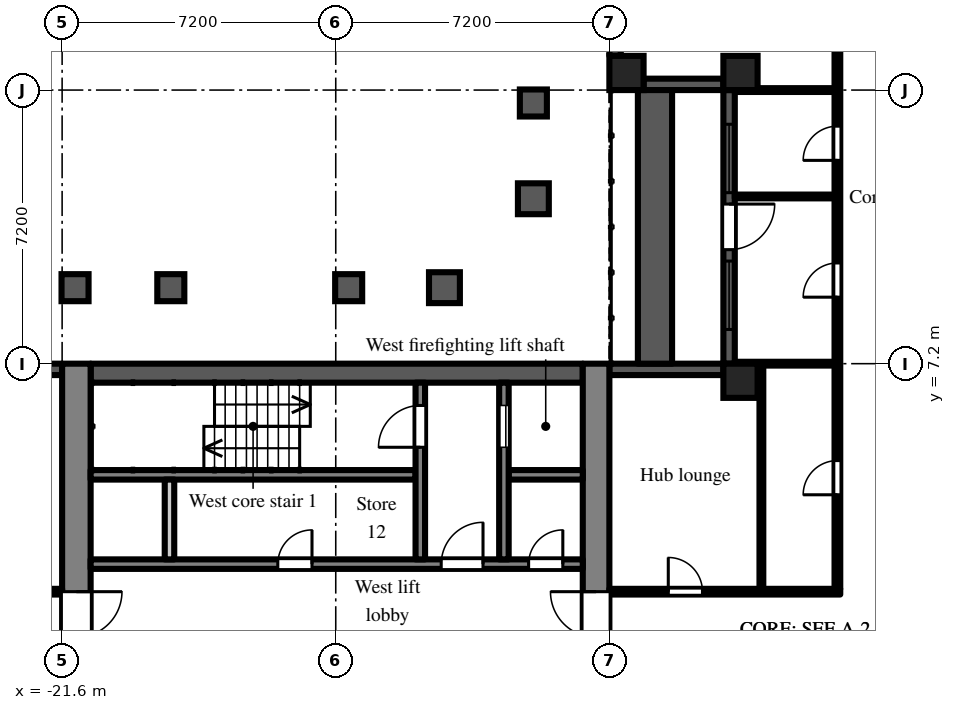
"""IFC4 building model, lengths in metres.
Left out: names, types, materials, properties, quantities, classifications, styles, units other than length and angle.
Written with IfcOpenShell. Run it as: python <this file> out.ifc"""

import sys

from ifc_helpers import new_model, si_unit, direction, frame, frame_2d, origin, origin_2d, place, context, subcontext, project, spatial, rectangle, extrude, element, fill, save


model = new_model("IFC4")
c1 = context("Model", 3, precision=1e-05, world=origin(), true_north=direction((0.0, 1.0)))
c2 = subcontext(c1, "Body", "Model", "MODEL_VIEW")
j1 = project(units=[si_unit("LENGTHUNIT", "METRE"), si_unit("PLANEANGLEUNIT", "RADIAN")], contexts=[c1])
p1 = place(None, origin())
s1 = spatial("IfcSite", under=j1, at=p1, CompositionType="ELEMENT")
p2 = place(p1, origin())
s2 = spatial("IfcBuilding", under=s1, at=p2, CompositionType="ELEMENT")
p3 = place(p2, frame((0.0, 0.0, 93.9)))
s3 = spatial("IfcBuildingStorey", under=s2, at=p3, CompositionType="ELEMENT", Elevation=93.9)
for number, where, z_axis, x_axis in (
    (1, (-6.75, 14.85, 0.0), (0.0, 0.0, 1.0), (1.0, 0.0, 0.0)),
    (2, (-3.75, 6.75, 0.0), (0.0, 0.0, 1.0), (1.0, 0.0, 0.0)),
    (3, (-3.75, 14.85, 0.0), (0.0, 0.0, 1.0), (1.0, 0.0, 0.0)),
):
    element("IfcColumn", number, at=place(p3, frame(where, z_axis=z_axis, x_axis=x_axis)), inside=s3, PredefinedType="COLUMN", context=c2, shape_type="SweptSolid", body=[
        extrude(rectangle(XDim=0.9, YDim=0.9, at=origin_2d()), origin(), (0.0, 0.0, 1.0), 3.0),
    ])
p4 = place(p3, frame((-7.05, 17.1, 0.0), z_axis=(0.0, 0.0, 1.0), x_axis=(0.0, -1.0, 0.0)))
e4 = element("IfcWall", 4, at=p4, inside=s3, PredefinedType="SOLIDWALL", context=c2, shape_type="SweptSolid", body=[
    extrude(rectangle(XDim=1.8, YDim=0.3, at=frame_2d((0.9, 0.0))), origin(), (0.0, 0.0, 1.0), 2.1),
])
p5 = place(p4, frame((0.3, 0.0, 0.2)))
e5 = element("IfcOpeningElement", 5, at=p5, cuts=e4, PredefinedType="OPENING", context=c2, shape_type="SweptSolid", body=[
    extrude(rectangle(XDim=1.2, YDim=1.85, at=frame_2d((0.6, 0.925))), frame((0.0, 0.16, 0.0), z_axis=(0.0, -1.0, 0.0), x_axis=(1.0, 0.0, 0.0)), (0.0, 0.0, 1.0), 0.32),
])
p6 = place(p3, frame((-6.3, 14.55, 0.0), z_axis=(0.0, 0.0, 1.0), x_axis=(1.0, 0.0, 0.0)))
e6 = element("IfcWall", 6, at=p6, inside=s3, PredefinedType="SOLIDWALL", context=c2, shape_type="SweptSolid", body=[
    extrude(rectangle(XDim=2.1, YDim=0.3, at=frame_2d((1.05, 0.0))), origin(), (0.0, 0.0, 1.0), 2.1),
])
p7 = place(p3, frame((-4.05, 14.4, 0.0), z_axis=(0.0, 0.0, 1.0), x_axis=(0.0, -1.0, 0.0)))
e7 = element("IfcWall", 7, at=p7, inside=s3, PredefinedType="SOLIDWALL", context=c2, shape_type="SweptSolid", body=[
    extrude(rectangle(XDim=7.2, YDim=0.3, at=frame_2d((3.6, 0.0))), origin(), (0.0, 0.0, 1.0), 2.1),
])
p8 = place(p7, frame((3.0, 0.0, 0.0)))
e8 = element("IfcOpeningElement", 8, at=p8, cuts=e7, PredefinedType="OPENING", context=c2, shape_type="SweptSolid", body=[
    extrude(rectangle(XDim=1.2, YDim=2.05, at=frame_2d((0.6, 1.025))), frame((0.0, 0.16, 0.0), z_axis=(0.0, -1.0, 0.0), x_axis=(1.0, 0.0, 0.0)), (0.0, 0.0, 1.0), 0.32),
])
p9 = place(p7, frame((0.9, 0.0, 0.2)))
e9 = element("IfcOpeningElement", 9, at=p9, cuts=e7, PredefinedType="OPENING", context=c2, shape_type="SweptSolid", body=[
    extrude(rectangle(XDim=1.8, YDim=1.85, at=frame_2d((0.9, 0.925))), frame((0.0, 0.16, 0.0), z_axis=(0.0, -1.0, 0.0), x_axis=(1.0, 0.0, 0.0)), (0.0, 0.0, 1.0), 0.32),
])
p10 = place(p7, frame((4.5, 0.0, 0.2)))
e10 = element("IfcOpeningElement", 10, at=p10, cuts=e7, PredefinedType="OPENING", context=c2, shape_type="SweptSolid", body=[
    extrude(rectangle(XDim=1.8, YDim=1.85, at=frame_2d((0.9, 0.925))), frame((0.0, 0.16, 0.0), z_axis=(0.0, -1.0, 0.0), x_axis=(1.0, 0.0, 0.0)), (0.0, 0.0, 1.0), 0.32),
])
p11 = place(p3, frame((-4.2, 7.05, 0.0), z_axis=(0.0, 0.0, 1.0), x_axis=(-1.0, 0.0, 0.0)))
e11 = element("IfcWall", 11, at=p11, inside=s3, PredefinedType="SOLIDWALL", context=c2, shape_type="SweptSolid", body=[
    extrude(rectangle(XDim=3.0, YDim=0.3, at=frame_2d((1.5, 0.0))), origin(), (0.0, 0.0, 1.0), 2.1),
])
p12 = place(p3, frame((-21.6, 7.05, 0.0), z_axis=(0.0, 0.0, 1.0), x_axis=(-1.0, 0.0, 0.0)))
e12 = element("IfcWall", 12, at=p12, inside=s3, PredefinedType="SOLIDWALL", context=c2, shape_type="SweptSolid", body=[
    extrude(rectangle(XDim=2.7, YDim=0.3, at=frame_2d((1.35, 0.0))), origin(), (0.0, 0.0, 1.0), 2.1),
])
p13 = place(p12, frame((0.75, 0.0, 0.2)))
e13 = element("IfcOpeningElement", 13, at=p13, cuts=e12, PredefinedType="OPENING", context=c2, shape_type="SweptSolid", body=[
    extrude(rectangle(XDim=1.2, YDim=1.85, at=frame_2d((0.6, 0.925))), frame((0.0, 0.16, 0.0), z_axis=(0.0, -1.0, 0.0), x_axis=(1.0, 0.0, 0.0)), (0.0, 0.0, 1.0), 0.32),
])
p14 = place(p3, frame((-6.0, 7.2, 0.0), z_axis=(0.0, 0.0, 1.0), x_axis=(0.0, 1.0, 0.0)))
e14 = element("IfcWall", 14, at=p14, inside=s3, PredefinedType="PARAPET", context=c2, shape_type="SweptSolid", body=[
    extrude(rectangle(XDim=7.2, YDim=0.9, at=frame_2d((3.6, 0.0))), origin(), (0.0, 0.0, 1.0), 0.8),
])
p15 = place(p3, frame((-7.55, -7.2, 0.0), z_axis=(0.0, 0.0, 1.0), x_axis=(0.0, 1.0, 0.0)))
e15 = element("IfcWall", 15, at=p15, inside=s3, PredefinedType="SHEAR", context=c2, shape_type="SweptSolid", body=[
    extrude(rectangle(XDim=14.4, YDim=0.7, at=frame_2d((7.2, 0.0))), origin(), (0.0, 0.0, 1.0), 2.575),
])
p16 = place(p15, frame((6.0, 0.0, 0.0)))
e16 = element("IfcOpeningElement", 16, at=p16, cuts=e15, PredefinedType="OPENING", context=c2, shape_type="SweptSolid", body=[
    extrude(rectangle(XDim=2.4, YDim=2.2, at=frame_2d((1.2, 1.1))), frame((0.0, 0.36, 0.0), z_axis=(0.0, -1.0, 0.0), x_axis=(1.0, 0.0, 0.0)), (0.0, 0.0, 1.0), 0.72),
])
p17 = place(p3, frame((-21.225, -7.2, 0.0), z_axis=(0.0, 0.0, 1.0), x_axis=(0.0, 1.0, 0.0)))
e17 = element("IfcWall", 17, at=p17, inside=s3, PredefinedType="SHEAR", context=c2, shape_type="SweptSolid", body=[
    extrude(rectangle(XDim=14.4, YDim=0.75, at=frame_2d((7.2, 0.0))), origin(), (0.0, 0.0, 1.0), 2.575),
])
p18 = place(p17, frame((6.0, 0.0, 0.0)))
e18 = element("IfcOpeningElement", 18, at=p18, cuts=e17, PredefinedType="OPENING", context=c2, shape_type="SweptSolid", body=[
    extrude(rectangle(XDim=2.4, YDim=2.2, at=frame_2d((1.2, 1.1))), frame((0.0, 0.385, 0.0), z_axis=(0.0, -1.0, 0.0), x_axis=(1.0, 0.0, 0.0)), (0.0, 0.0, 1.0), 0.77),
])
p19 = place(p3, frame((-7.9, 6.95, 0.0), z_axis=(0.0, 0.0, 1.0), x_axis=(-1.0, 0.0, 0.0)))
e19 = element("IfcWall", 19, at=p19, inside=s3, PredefinedType="SHEAR", context=c2, shape_type="SweptSolid", body=[
    extrude(rectangle(XDim=12.95, YDim=0.5, at=frame_2d((6.475, 0.0))), origin(), (0.0, 0.0, 1.0), 2.575),
])
p20 = place(p3, frame((-7.9, 1.925, 0.0), z_axis=(0.0, 0.0, 1.0), x_axis=(-1.0, 0.0, 0.0)))
e20 = element("IfcWall", 20, at=p20, inside=s3, PredefinedType="SHEAR", context=c2, shape_type="SweptSolid", body=[
    extrude(rectangle(XDim=12.95, YDim=0.25, at=frame_2d((6.475, 0.0))), origin(), (0.0, 0.0, 1.0), 2.575),
])
p21 = place(p20, frame((0.525, 0.0, 0.0)))
e21 = element("IfcOpeningElement", 21, at=p21, cuts=e20, PredefinedType="OPENING", context=c2, shape_type="SweptSolid", body=[
    extrude(rectangle(XDim=0.9, YDim=2.1, at=frame_2d((0.45, 1.05))), frame((0.0, 0.135, 0.0), z_axis=(0.0, -1.0, 0.0), x_axis=(1.0, 0.0, 0.0)), (0.0, 0.0, 1.0), 0.27),
])
p22 = place(p20, frame((2.625, 0.0, 0.0)))
e22 = element("IfcOpeningElement", 22, at=p22, cuts=e20, PredefinedType="OPENING", context=c2, shape_type="SweptSolid", body=[
    extrude(rectangle(XDim=1.1, YDim=2.1, at=frame_2d((0.55, 1.05))), frame((0.0, 0.135, 0.0), z_axis=(0.0, -1.0, 0.0), x_axis=(1.0, 0.0, 0.0)), (0.0, 0.0, 1.0), 0.27),
])
p23 = place(p20, frame((7.125, 0.0, 0.0)))
e23 = element("IfcOpeningElement", 23, at=p23, cuts=e20, PredefinedType="OPENING", context=c2, shape_type="SweptSolid", body=[
    extrude(rectangle(XDim=0.9, YDim=2.1, at=frame_2d((0.45, 1.05))), frame((0.0, 0.135, 0.0), z_axis=(0.0, -1.0, 0.0), x_axis=(1.0, 0.0, 0.0)), (0.0, 0.0, 1.0), 0.27),
])
p24 = place(p3, frame((-7.9, 4.275, 0.0), z_axis=(0.0, 0.0, 1.0), x_axis=(-1.0, 0.0, 0.0)))
e24 = element("IfcWall", 24, at=p24, inside=s3, PredefinedType="SHEAR", context=c2, shape_type="SweptSolid", body=[
    extrude(rectangle(XDim=1.95, YDim=0.25, at=frame_2d((0.975, 0.0))), origin(), (0.0, 0.0, 1.0), 2.575),
])
p25 = place(p3, frame((-12.3, 4.275, 0.0), z_axis=(0.0, 0.0, 1.0), x_axis=(-1.0, 0.0, 0.0)))
e25 = element("IfcWall", 25, at=p25, inside=s3, PredefinedType="SHEAR", context=c2, shape_type="SweptSolid", body=[
    extrude(rectangle(XDim=8.55, YDim=0.25, at=frame_2d((4.275, 0.0))), origin(), (0.0, 0.0, 1.0), 2.575),
])
p26 = place(p3, frame((-9.975, 2.05, 0.0), z_axis=(0.0, 0.0, 1.0), x_axis=(0.0, 1.0, 0.0)))
e26 = element("IfcWall", 26, at=p26, inside=s3, PredefinedType="SHEAR", context=c2, shape_type="SweptSolid", body=[
    extrude(rectangle(XDim=4.65, YDim=0.25, at=frame_2d((2.325, 0.0))), origin(), (0.0, 0.0, 1.0), 2.575),
])
p27 = place(p26, frame((2.95, 0.0, 0.0)))
e27 = element("IfcOpeningElement", 27, at=p27, cuts=e26, PredefinedType="OPENING", context=c2, shape_type="SweptSolid", body=[
    extrude(rectangle(XDim=1.1, YDim=2.1, at=frame_2d((0.55, 1.05))), frame((0.0, 0.135, 0.0), z_axis=(0.0, -1.0, 0.0), x_axis=(1.0, 0.0, 0.0)), (0.0, 0.0, 1.0), 0.27),
])
p28 = place(p3, frame((-12.175, 2.05, 0.0), z_axis=(0.0, 0.0, 1.0), x_axis=(0.0, 1.0, 0.0)))
e28 = element("IfcWall", 28, at=p28, inside=s3, PredefinedType="SHEAR", context=c2, shape_type="SweptSolid", body=[
    extrude(rectangle(XDim=4.65, YDim=0.25, at=frame_2d((2.325, 0.0))), origin(), (0.0, 0.0, 1.0), 2.575),
])
p29 = place(p28, frame((2.95, 0.0, 0.0)))
e29 = element("IfcOpeningElement", 29, at=p29, cuts=e28, PredefinedType="OPENING", context=c2, shape_type="SweptSolid", body=[
    extrude(rectangle(XDim=1.1, YDim=2.1, at=frame_2d((0.55, 1.05))), frame((0.0, 0.135, 0.0), z_axis=(0.0, -1.0, 0.0), x_axis=(1.0, 0.0, 0.0)), (0.0, 0.0, 1.0), 0.27),
])
p30 = place(p3, frame((-18.775, 2.05, 0.0), z_axis=(0.0, 0.0, 1.0), x_axis=(0.0, 1.0, 0.0)))
e30 = element("IfcWall", 30, at=p30, inside=s3, PredefinedType="PARTITIONING", context=c2, shape_type="SweptSolid", body=[
    extrude(rectangle(XDim=2.1, YDim=0.25, at=frame_2d((1.05, 0.0))), origin(), (0.0, 0.0, 1.0), 2.575),
])
p31 = place(p3, frame((-36.5, 1.2, 0.0), z_axis=(0.0, 0.0, 1.0), x_axis=(1.0, 0.0, 0.0)))
e31 = element("IfcWall", 31, at=p31, inside=s3, PredefinedType="PARTITIONING", context=c2, shape_type="SweptSolid", body=[
    extrude(rectangle(XDim=14.9, YDim=0.15, at=frame_2d((7.45, 0.0))), origin(), (0.0, 0.0, 1.0), 2.575),
])
p32 = place(p31, frame((10.4, 0.0, 0.0)))
e32 = element("IfcOpeningElement", 32, at=p32, cuts=e31, PredefinedType="OPENING", context=c2, shape_type="SweptSolid", body=[
    extrude(rectangle(XDim=1.8, YDim=2.1, at=frame_2d((0.9, 1.05))), frame((0.0, 0.085, 0.0), z_axis=(0.0, -1.0, 0.0), x_axis=(1.0, 0.0, 0.0)), (0.0, 0.0, 1.0), 0.17),
])
p33 = place(p31, frame((4.7, 0.0, 0.0)))
e33 = element("IfcOpeningElement", 33, at=p33, cuts=e31, PredefinedType="OPENING", context=c2, shape_type="SweptSolid", body=[
    extrude(rectangle(XDim=1.0, YDim=2.1, at=frame_2d((0.5, 1.05))), frame((0.0, 0.085, 0.0), z_axis=(0.0, -1.0, 0.0), x_axis=(1.0, 0.0, 0.0)), (0.0, 0.0, 1.0), 0.17),
])
p34 = place(p31, frame((1.15, 0.0, 0.0)))
e34 = element("IfcOpeningElement", 34, at=p34, cuts=e31, PredefinedType="OPENING", context=c2, shape_type="SweptSolid", body=[
    extrude(rectangle(XDim=1.8, YDim=2.1, at=frame_2d((0.9, 1.05))), frame((0.0, 0.085, 0.0), z_axis=(0.0, -1.0, 0.0), x_axis=(1.0, 0.0, 0.0)), (0.0, 0.0, 1.0), 0.17),
])
p35 = place(p3, frame((-7.2, 1.2, 0.0), z_axis=(0.0, 0.0, 1.0), x_axis=(1.0, 0.0, 0.0)))
e35 = element("IfcWall", 35, at=p35, inside=s3, PredefinedType="PARTITIONING", context=c2, shape_type="SweptSolid", body=[
    extrude(rectangle(XDim=6.075, YDim=0.15, at=frame_2d((3.038, 0.0))), origin(), (0.0, 0.0, 1.0), 2.575),
])
p36 = place(p35, frame((1.55, 0.0, 0.0)))
e36 = element("IfcOpeningElement", 36, at=p36, cuts=e35, PredefinedType="OPENING", context=c2, shape_type="SweptSolid", body=[
    extrude(rectangle(XDim=0.9, YDim=2.1, at=frame_2d((0.45, 1.05))), frame((0.0, 0.085, 0.0), z_axis=(0.0, -1.0, 0.0), x_axis=(1.0, 0.0, 0.0)), (0.0, 0.0, 1.0), 0.17),
])
for number, where, z_axis, x_axis in (
    (37, (-3.9, 7.2, 0.0), (0.0, 0.0, 1.0), (1.0, 0.0, 0.0)),
    (38, (-3.9, 11.6, 0.0), (0.0, 0.0, 1.0), (1.0, 0.0, 0.0)),
    (39, (-3.9, 14.4, 0.0), (0.0, 0.0, 1.0), (1.0, 0.0, 0.0)),
):
    element("IfcWall", number, at=place(p3, frame(where, z_axis=z_axis, x_axis=x_axis)), inside=s3, PredefinedType="PARTITIONING", context=c2, shape_type="SweptSolid", body=[
        extrude(rectangle(XDim=2.625, YDim=0.1, at=frame_2d((1.312, 0.0))), origin(), (0.0, 0.0, 1.0), 2.575),
    ])
p37 = place(p3, frame((-3.2, 1.275, 0.0), z_axis=(0.0, 0.0, 1.0), x_axis=(0.0, 1.0, 0.0)))
e40 = element("IfcWall", 40, at=p37, inside=s3, PredefinedType="PARTITIONING", context=c2, shape_type="SweptSolid", body=[
    extrude(rectangle(XDim=5.875, YDim=0.1, at=frame_2d((2.938, 0.0))), origin(), (0.0, 0.0, 1.0), 2.575),
])
p38 = place(p3, frame((-1.2, 1.275, 0.0), z_axis=(0.0, 0.0, 1.0), x_axis=(0.0, 1.0, 0.0)))
e41 = element("IfcWall", 41, at=p38, inside=s3, PredefinedType="PARTITIONING", context=c2, shape_type="SweptSolid", body=[
    extrude(rectangle(XDim=20.025, YDim=0.15, at=frame_2d((10.013, 0.0))), origin(), (0.0, 0.0, 1.0), 2.575),
])
p39 = place(p38, frame((2.475, 0.0, 0.0)))
e42 = element("IfcOpeningElement", 42, at=p39, cuts=e41, PredefinedType="OPENING", context=c2, shape_type="SweptSolid", body=[
    extrude(rectangle(XDim=0.9, YDim=2.1, at=frame_2d((0.45, 1.05))), frame((0.0, 0.085, 0.0), z_axis=(0.0, -1.0, 0.0), x_axis=(1.0, 0.0, 0.0)), (0.0, 0.0, 1.0), 0.17),
])
p40 = place(p38, frame((11.275, 0.0, 0.0)))
e43 = element("IfcOpeningElement", 43, at=p40, cuts=e41, PredefinedType="OPENING", context=c2, shape_type="SweptSolid", body=[
    extrude(rectangle(XDim=0.9, YDim=2.1, at=frame_2d((0.45, 1.05))), frame((0.0, 0.085, 0.0), z_axis=(0.0, -1.0, 0.0), x_axis=(1.0, 0.0, 0.0)), (0.0, 0.0, 1.0), 0.17),
])
p41 = place(p38, frame((7.675, 0.0, 0.0)))
e44 = element("IfcOpeningElement", 44, at=p41, cuts=e41, PredefinedType="OPENING", context=c2, shape_type="SweptSolid", body=[
    extrude(rectangle(XDim=0.9, YDim=2.1, at=frame_2d((0.45, 1.05))), frame((0.0, 0.085, 0.0), z_axis=(0.0, -1.0, 0.0), x_axis=(1.0, 0.0, 0.0)), (0.0, 0.0, 1.0), 0.17),
])
p42 = place(p38, frame((15.675, 0.0, 0.0)))
e45 = element("IfcOpeningElement", 45, at=p42, cuts=e41, PredefinedType="OPENING", context=c2, shape_type="SweptSolid", body=[
    extrude(rectangle(XDim=1.8, YDim=2.1, at=frame_2d((0.9, 1.05))), frame((0.0, 0.085, 0.0), z_axis=(0.0, -1.0, 0.0), x_axis=(1.0, 0.0, 0.0)), (0.0, 0.0, 1.0), 0.17),
])
p43 = place(p8, origin())
e46 = element("IfcDoor", 46, at=p43, inside=s3, OperationType="SINGLE_SWING_LEFT", PredefinedType="DOOR", context=c2, shape_type="SweptSolid", body=[
    extrude(rectangle(XDim=1.2, YDim=2.05, at=frame_2d((0.6, 1.025))), frame((0.0, 0.025, 0.0), z_axis=(0.0, -1.0, 0.0), x_axis=(1.0, 0.0, 0.0)), (0.0, 0.0, 1.0), 0.05),
])
fill(e8, e46)
p44 = place(p9, origin())
e47 = element("IfcWindow", 47, at=p44, inside=s3, PartitioningType="SINGLE_PANEL", PredefinedType="WINDOW", context=c2, shape_type="SweptSolid", body=[
    extrude(rectangle(XDim=1.8, YDim=1.85, at=frame_2d((0.9, 0.925))), frame((0.0, 0.03, 0.0), z_axis=(0.0, -1.0, 0.0), x_axis=(1.0, 0.0, 0.0)), (0.0, 0.0, 1.0), 0.06),
])
fill(e9, e47)
p45 = place(p10, origin())
e48 = element("IfcWindow", 48, at=p45, inside=s3, PartitioningType="SINGLE_PANEL", PredefinedType="WINDOW", context=c2, shape_type="SweptSolid", body=[
    extrude(rectangle(XDim=1.8, YDim=1.85, at=frame_2d((0.9, 0.925))), frame((0.0, 0.03, 0.0), z_axis=(0.0, -1.0, 0.0), x_axis=(1.0, 0.0, 0.0)), (0.0, 0.0, 1.0), 0.06),
])
fill(e10, e48)
p46 = place(p27, origin())
e49 = element("IfcDoor", 49, at=p46, inside=s3, OperationType="SLIDING_TO_LEFT", PredefinedType="DOOR", context=c2, shape_type="SweptSolid", body=[
    extrude(rectangle(XDim=1.1, YDim=2.1, at=frame_2d((0.55, 1.05))), frame((0.0, 0.025, 0.0), z_axis=(0.0, -1.0, 0.0), x_axis=(1.0, 0.0, 0.0)), (0.0, 0.0, 1.0), 0.05),
])
fill(e27, e49)
p47 = place(p29, origin())
e50 = element("IfcDoor", 50, at=p47, inside=s3, OperationType="SINGLE_SWING_LEFT", PredefinedType="DOOR", context=c2, shape_type="SweptSolid", body=[
    extrude(rectangle(XDim=1.1, YDim=2.1, at=frame_2d((0.55, 1.05))), frame((0.0, 0.025, 0.0), z_axis=(0.0, -1.0, 0.0), x_axis=(1.0, 0.0, 0.0)), (0.0, 0.0, 1.0), 0.05),
])
fill(e29, e50)
p48 = place(p21, frame((0.9, 0.0, 0.0), z_axis=(0.0, 0.0, 1.0), x_axis=(-1.0, 0.0, 0.0)))
e51 = element("IfcDoor", 51, at=p48, inside=s3, OperationType="SINGLE_SWING_RIGHT", PredefinedType="DOOR", context=c2, shape_type="SweptSolid", body=[
    extrude(rectangle(XDim=0.9, YDim=2.1, at=frame_2d((0.45, 1.05))), frame((0.0, 0.025, 0.0), z_axis=(0.0, -1.0, 0.0), x_axis=(1.0, 0.0, 0.0)), (0.0, 0.0, 1.0), 0.05),
])
fill(e21, e51)
p49 = place(p22, frame((1.1, 0.0, 0.0), z_axis=(0.0, 0.0, 1.0), x_axis=(-1.0, 0.0, 0.0)))
e52 = element("IfcDoor", 52, at=p49, inside=s3, OperationType="SINGLE_SWING_RIGHT", PredefinedType="DOOR", context=c2, shape_type="SweptSolid", body=[
    extrude(rectangle(XDim=1.1, YDim=2.1, at=frame_2d((0.55, 1.05))), frame((0.0, 0.025, 0.0), z_axis=(0.0, -1.0, 0.0), x_axis=(1.0, 0.0, 0.0)), (0.0, 0.0, 1.0), 0.05),
])
fill(e22, e52)
p50 = place(p16, origin())
e53 = element("IfcDoor", 53, at=p50, inside=s3, OperationType="DOUBLE_DOOR_DOUBLE_SWING", PredefinedType="DOOR", context=c2, shape_type="SweptSolid", body=[
    extrude(rectangle(XDim=2.4, YDim=2.2, at=frame_2d((1.2, 1.1))), frame((0.0, 0.025, 0.0), z_axis=(0.0, -1.0, 0.0), x_axis=(1.0, 0.0, 0.0)), (0.0, 0.0, 1.0), 0.05),
])
fill(e16, e53)
p51 = place(p18, frame((2.4, 0.0, 0.0), z_axis=(0.0, 0.0, 1.0), x_axis=(-1.0, 0.0, 0.0)))
e54 = element("IfcDoor", 54, at=p51, inside=s3, OperationType="DOUBLE_DOOR_DOUBLE_SWING", PredefinedType="DOOR", context=c2, shape_type="SweptSolid", body=[
    extrude(rectangle(XDim=2.4, YDim=2.2, at=frame_2d((1.2, 1.1))), frame((0.0, 0.025, 0.0), z_axis=(0.0, -1.0, 0.0), x_axis=(1.0, 0.0, 0.0)), (0.0, 0.0, 1.0), 0.05),
])
fill(e18, e54)
p52 = place(p23, frame((0.9, 0.0, 0.0), z_axis=(0.0, 0.0, 1.0), x_axis=(-1.0, 0.0, 0.0)))
e55 = element("IfcDoor", 55, at=p52, inside=s3, OperationType="SINGLE_SWING_RIGHT", PredefinedType="DOOR", context=c2, shape_type="SweptSolid", body=[
    extrude(rectangle(XDim=0.9, YDim=2.1, at=frame_2d((0.45, 1.05))), frame((0.0, 0.025, 0.0), z_axis=(0.0, -1.0, 0.0), x_axis=(1.0, 0.0, 0.0)), (0.0, 0.0, 1.0), 0.05),
])
fill(e23, e55)
p53 = place(p39, origin())
e56 = element("IfcDoor", 56, at=p53, inside=s3, OperationType="SINGLE_SWING_LEFT", PredefinedType="DOOR", context=c2, shape_type="SweptSolid", body=[
    extrude(rectangle(XDim=0.9, YDim=2.1, at=frame_2d((0.45, 1.05))), frame((0.0, 0.025, 0.0), z_axis=(0.0, -1.0, 0.0), x_axis=(1.0, 0.0, 0.0)), (0.0, 0.0, 1.0), 0.05),
])
fill(e42, e56)
p54 = place(p36, origin())
e57 = element("IfcDoor", 57, at=p54, inside=s3, OperationType="SINGLE_SWING_LEFT", PredefinedType="DOOR", context=c2, shape_type="SweptSolid", body=[
    extrude(rectangle(XDim=0.9, YDim=2.1, at=frame_2d((0.45, 1.05))), frame((0.0, 0.025, 0.0), z_axis=(0.0, -1.0, 0.0), x_axis=(1.0, 0.0, 0.0)), (0.0, 0.0, 1.0), 0.05),
])
fill(e36, e57)
p55 = place(p40, origin())
e58 = element("IfcDoor", 58, at=p55, inside=s3, OperationType="SINGLE_SWING_LEFT", PredefinedType="DOOR", context=c2, shape_type="SweptSolid", body=[
    extrude(rectangle(XDim=0.9, YDim=2.1, at=frame_2d((0.45, 1.05))), frame((0.0, 0.025, 0.0), z_axis=(0.0, -1.0, 0.0), x_axis=(1.0, 0.0, 0.0)), (0.0, 0.0, 1.0), 0.05),
])
fill(e43, e58)
p56 = place(p41, origin())
e59 = element("IfcDoor", 59, at=p56, inside=s3, OperationType="SINGLE_SWING_LEFT", PredefinedType="DOOR", context=c2, shape_type="SweptSolid", body=[
    extrude(rectangle(XDim=0.9, YDim=2.1, at=frame_2d((0.45, 1.05))), frame((0.0, 0.025, 0.0), z_axis=(0.0, -1.0, 0.0), x_axis=(1.0, 0.0, 0.0)), (0.0, 0.0, 1.0), 0.05),
])
fill(e44, e59)
save(model, sys.argv[1])
